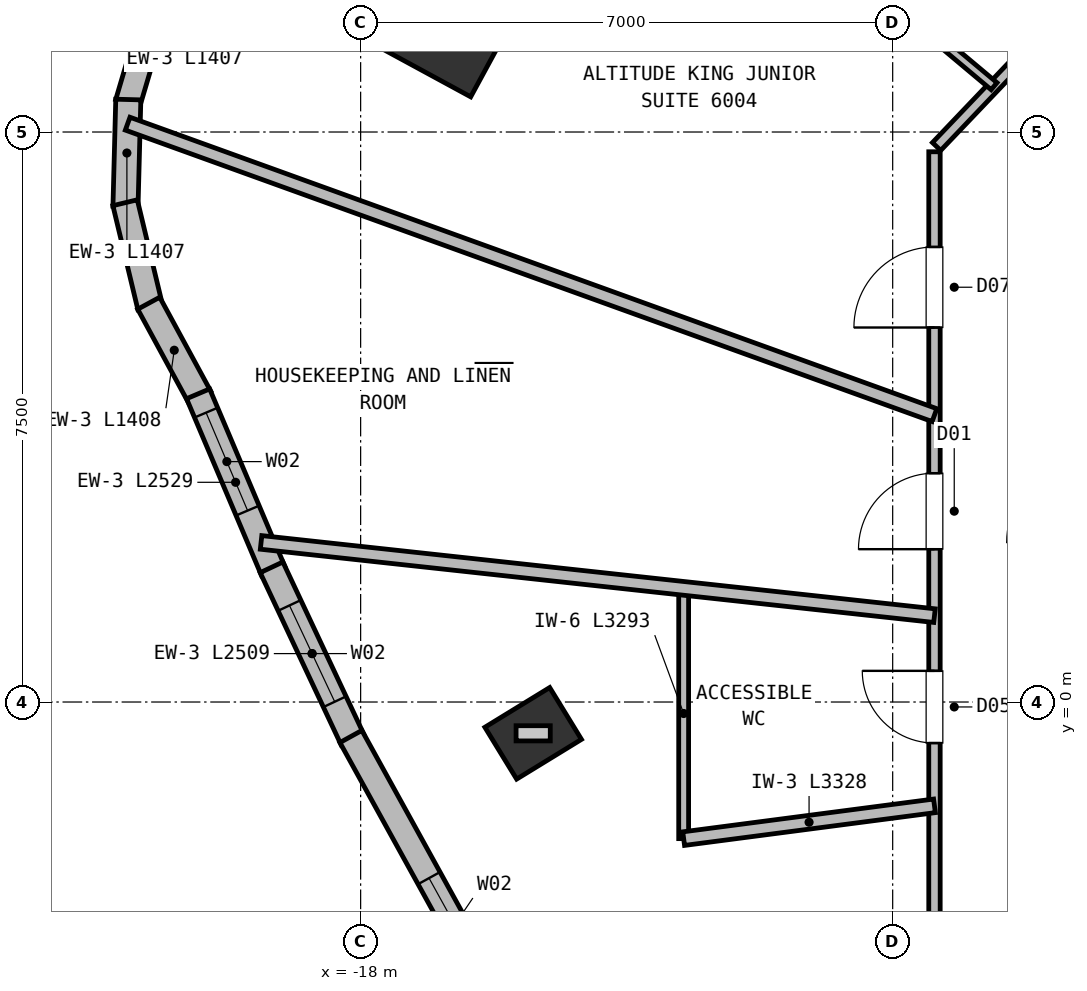
"""IFC4 building model, lengths in metres.
Left out: names, types, materials, properties, quantities, classifications, styles, units other than length and angle.
Written with IfcOpenShell. Run it as: python <this file> out.ifc"""

import sys

from ifc_helpers import new_model, si_unit, direction, frame, frame_2d, origin, origin_2d, place, context, subcontext, project, spatial, rectangle, extrude, element, fill, save


model = new_model("IFC4")
c1 = context("Model", 3, precision=1e-05, world=origin(), true_north=direction((0.0, 1.0)))
c2 = subcontext(c1, "Body", "Model", "MODEL_VIEW")
j1 = project(units=[si_unit("LENGTHUNIT", "METRE"), si_unit("PLANEANGLEUNIT", "RADIAN")], contexts=[c1])
p1 = place(None, origin())
s1 = spatial("IfcSite", under=j1, at=p1, CompositionType="ELEMENT")
p2 = place(p1, origin())
s2 = spatial("IfcBuilding", under=s1, at=p2, CompositionType="ELEMENT")
p3 = place(p2, frame((0.0, 0.0, 228.35)))
s3 = spatial("IfcBuildingStorey", under=s2, at=p3, CompositionType="ELEMENT", Elevation=228.35)
p4 = place(p3, frame((-16.76, 9.1, 0.0), z_axis=(0.0, 0.0, 1.0), x_axis=(-0.878817112662, 0.47715876026, 0.0)))
e1 = element("IfcColumn", 1, at=p4, inside=s3, PredefinedType="COLUMN", context=c2, shape_type="SweptSolid", body=[
    extrude(rectangle(XDim=1.45, YDim=1.8, at=origin_2d()), origin(), (0.0, 0.0, 1.0), 3.8),
])
p5 = place(p3, frame((-15.73, -0.412, 0.0), z_axis=(0.0, 0.0, 1.0), x_axis=(-0.522498564716, 0.852640164354, 0.0)))
e2 = element("IfcColumn", 2, at=p5, inside=s3, PredefinedType="COLUMN", context=c2, shape_type="SweptSolid", body=[
    extrude(rectangle(XDim=0.8, YDim=1.0, at=origin_2d()), origin(), (0.0, 0.0, 1.0), 3.8),
])
p6 = place(p3, frame((-21.065, 7.878, 0.0), z_axis=(0.0, 0.0, 1.0), x_axis=(0.284100140437, 0.958794613149, 0.0)))
e3 = element("IfcWall", 3, at=p6, inside=s3, PredefinedType="SOLIDWALL", context=c2, shape_type="SweptSolid", body=[
    extrude(rectangle(XDim=1.408, YDim=0.33, at=frame_2d((0.704, 0.0))), origin(), (0.0, 0.0, 1.0), 3.55),
])
for number, where, z_axis, x_axis in (
    (4, (-21.094, 6.52, 0.0), (0.0, 0.0, 1.0), (0.026, 1.0, 0.0)),
    (5, (-20.77, 5.201, 0.0), (0.0, 0.0, 1.0), (-0.233, 0.972, 0.0)),
):
    element("IfcWall", number, at=place(p3, frame(where, z_axis=z_axis, x_axis=x_axis)), inside=s3, PredefinedType="SOLIDWALL", context=c2, shape_type="SweptSolid", body=[
        extrude(rectangle(XDim=1.407, YDim=0.33, at=frame_2d((0.704, 0.0))), origin(), (0.0, 0.0, 1.0), 3.55),
    ])
p7 = place(p3, frame((-20.116, 4.01, 0.0), z_axis=(0.0, 0.0, 1.0), x_axis=(-0.477137792558, 0.878828496871, 0.0)))
e6 = element("IfcWall", 6, at=p7, inside=s3, PredefinedType="SOLIDWALL", context=c2, shape_type="SweptSolid", body=[
    extrude(rectangle(XDim=1.408, YDim=0.33, at=frame_2d((0.704, 0.0))), origin(), (0.0, 0.0, 1.0), 3.55),
])
p8 = place(p3, frame((-19.152, 1.727, 0.0), z_axis=(0.0, 0.0, 1.0), x_axis=(-0.390140710462, 0.920755247631, 0.0)))
e7 = element("IfcWall", 7, at=p8, inside=s3, PredefinedType="SOLIDWALL", context=c2, shape_type="SweptSolid", body=[
    extrude(rectangle(XDim=2.529, YDim=0.33, at=frame_2d((1.264, 0.0))), origin(), (0.0, 0.0, 1.0), 3.55),
])
p9 = place(p8, frame((0.86, 0.0, 0.72)))
e8 = element("IfcOpeningElement", 8, at=p9, cuts=e7, PredefinedType="OPENING", context=c2, shape_type="SweptSolid", body=[
    extrude(rectangle(XDim=1.4, YDim=1.84, at=frame_2d((0.7, 0.92))), frame((0.0, 0.175, 0.0), z_axis=(0.0, -1.0, 0.0), x_axis=(1.0, 0.0, 0.0)), (0.0, 0.0, 1.0), 0.35),
])
p10 = place(p3, frame((-18.105, -0.498, 0.0), z_axis=(0.0, 0.0, 1.0), x_axis=(-0.425281427791, 0.905061162119, 0.0)))
e9 = element("IfcWall", 9, at=p10, inside=s3, PredefinedType="SOLIDWALL", context=c2, shape_type="SweptSolid", body=[
    extrude(rectangle(XDim=2.509, YDim=0.33, at=frame_2d((1.254, 0.0))), origin(), (0.0, 0.0, 1.0), 3.55),
])
p11 = place(p10, frame((0.554, 0.0, 0.72)))
e10 = element("IfcOpeningElement", 10, at=p11, cuts=e9, PredefinedType="OPENING", context=c2, shape_type="SweptSolid", body=[
    extrude(rectangle(XDim=1.4, YDim=1.84, at=frame_2d((0.7, 0.92))), frame((0.0, 0.175, 0.0), z_axis=(0.0, -1.0, 0.0), x_axis=(1.0, 0.0, 0.0)), (0.0, 0.0, 1.0), 0.35),
])
p12 = place(p3, frame((-15.395, -5.406, 0.0), z_axis=(0.0, 0.0, 1.0), x_axis=(-0.483083047652, 0.87557453656, 0.0)))
e11 = element("IfcWall", 11, at=p12, inside=s3, PredefinedType="SOLIDWALL", context=c2, shape_type="SweptSolid", body=[
    extrude(rectangle(XDim=5.657, YDim=0.33, at=frame_2d((2.828, 0.0))), origin(), (0.0, 0.0, 1.0), 3.55),
])
p13 = place(p12, frame((2.128, 0.0, 0.72)))
e12 = element("IfcOpeningElement", 12, at=p13, cuts=e11, PredefinedType="OPENING", context=c2, shape_type="SweptSolid", body=[
    extrude(rectangle(XDim=1.4, YDim=1.88, at=frame_2d((0.7, 0.94))), frame((0.0, 0.175, 0.0), z_axis=(0.0, -1.0, 0.0), x_axis=(1.0, 0.0, 0.0)), (0.0, 0.0, 1.0), 0.35),
])
p14 = place(p3, frame((-10.422, 7.309, 0.0), z_axis=(0.0, 0.0, 1.0), x_axis=(0.689960858356, 0.723846678473, 0.0)))
e13 = element("IfcWall", 13, at=p14, inside=s3, PredefinedType="PARTITIONING", context=c2, shape_type="SweptSolid", body=[
    extrude(rectangle(XDim=2.572, YDim=0.15, at=frame_2d((1.286, 0.0))), origin(), (0.0, 0.0, 1.0), 3.55),
])
p15 = place(p3, frame((-10.45, -7.24, 0.0), z_axis=(0.0, 0.0, 1.0), x_axis=(0.0, 1.0, 0.0)))
e14 = element("IfcWall", 14, at=p15, inside=s3, PredefinedType="PARTITIONING", context=c2, shape_type="SweptSolid", body=[
    extrude(rectangle(XDim=14.48, YDim=0.15, at=frame_2d((7.24, 0.0))), origin(), (0.0, 0.0, 1.0), 3.23),
])
p16 = place(p15, frame((6.7, 0.0, 0.0)))
e15 = element("IfcOpeningElement", 15, at=p16, cuts=e14, PredefinedType="OPENING", context=c2, shape_type="SweptSolid", body=[
    extrude(rectangle(XDim=0.95, YDim=2.1, at=frame_2d((0.475, 1.05))), frame((0.0, 0.085, 0.0), z_axis=(0.0, -1.0, 0.0), x_axis=(1.0, 0.0, 0.0)), (0.0, 0.0, 1.0), 0.17),
])
p17 = place(p15, frame((9.251, 0.0, 0.0)))
e16 = element("IfcOpeningElement", 16, at=p17, cuts=e14, PredefinedType="OPENING", context=c2, shape_type="SweptSolid", body=[
    extrude(rectangle(XDim=1.0, YDim=2.15, at=frame_2d((0.5, 1.075))), frame((0.0, 0.085, 0.0), z_axis=(0.0, -1.0, 0.0), x_axis=(1.0, 0.0, 0.0)), (0.0, 0.0, 1.0), 0.17),
])
p18 = place(p15, frame((2.577, 0.0, 0.0)))
e17 = element("IfcOpeningElement", 17, at=p18, cuts=e14, PredefinedType="OPENING", context=c2, shape_type="SweptSolid", body=[
    extrude(rectangle(XDim=1.0, YDim=2.15, at=frame_2d((0.5, 1.075))), frame((0.0, 0.085, 0.0), z_axis=(0.0, -1.0, 0.0), x_axis=(1.0, 0.0, 0.0)), (0.0, 0.0, 1.0), 0.17),
])
p19 = place(p15, frame((12.167, 0.0, 0.0)))
e18 = element("IfcOpeningElement", 18, at=p19, cuts=e14, PredefinedType="OPENING", context=c2, shape_type="SweptSolid", body=[
    extrude(rectangle(XDim=1.06, YDim=2.15, at=frame_2d((0.53, 1.075))), frame((0.0, 0.085, 0.0), z_axis=(0.0, -1.0, 0.0), x_axis=(1.0, 0.0, 0.0)), (0.0, 0.0, 1.0), 0.17),
])
p20 = place(p3, frame((-13.75, -1.798, 0.0), z_axis=(0.0, 0.0, 1.0), x_axis=(0.0, 1.0, 0.0)))
e19 = element("IfcWall", 19, at=p20, inside=s3, PredefinedType="PARTITIONING", context=c2, shape_type="SweptSolid", body=[
    extrude(rectangle(XDim=3.293, YDim=0.13, at=frame_2d((1.646, 0.0))), origin(), (0.0, 0.0, 1.0), 3.55),
])
p21 = place(p3, frame((-10.45, -1.366, 0.0), z_axis=(0.0, 0.0, 1.0), x_axis=(-0.991563556278, -0.129621425164, 0.0)))
e20 = element("IfcWall", 20, at=p21, inside=s3, PredefinedType="PARTITIONING", context=c2, shape_type="SweptSolid", body=[
    extrude(rectangle(XDim=3.328, YDim=0.18, at=frame_2d((1.664, 0.0))), origin(), (0.0, 0.0, 1.0), 3.55),
])
p22 = place(p3, frame((-9.666, 8.103, 0.0), z_axis=(0.0, 0.0, 1.0), x_axis=(-0.766392114791, 0.64237304301, 0.0)))
e21 = element("IfcWall", 21, at=p22, inside=s3, PredefinedType="PARTITIONING", context=c2, shape_type="SweptSolid", body=[
    extrude(rectangle(XDim=2.455, YDim=0.12, at=frame_2d((1.228, 0.0))), origin(), (0.0, 0.0, 1.0), 3.55),
])
p23 = place(p3, frame((-10.45, 3.775, 0.0), z_axis=(0.0, 0.0, 1.0), x_axis=(-0.9405132002, 0.339757148931, 0.0)))
e22 = element("IfcWall", 22, at=p23, inside=s3, PredefinedType="PARTITIONING", context=c2, shape_type="SweptSolid", body=[
    extrude(rectangle(XDim=11.287, YDim=0.18, at=frame_2d((5.643, 0.0))), origin(), (0.0, 0.0, 1.0), 3.55),
])
p24 = place(p3, frame((-10.45, 1.136, 0.0), z_axis=(0.0, 0.0, 1.0), x_axis=(-0.994137295644, 0.108125100741, 0.0)))
e23 = element("IfcWall", 23, at=p24, inside=s3, PredefinedType="PARTITIONING", context=c2, shape_type="SweptSolid", body=[
    extrude(rectangle(XDim=8.912, YDim=0.18, at=frame_2d((4.456, 0.0))), origin(), (0.0, 0.0, 1.0), 3.55),
])
p25 = place(p9, origin())
e24 = element("IfcWindow", 24, at=p25, inside=s3, PartitioningType="SINGLE_PANEL", PredefinedType="WINDOW", context=c2, shape_type="SweptSolid", body=[
    extrude(rectangle(XDim=1.4, YDim=1.84, at=frame_2d((0.7, 0.92))), frame((0.0, 0.03, 0.0), z_axis=(0.0, -1.0, 0.0), x_axis=(1.0, 0.0, 0.0)), (0.0, 0.0, 1.0), 0.06),
])
fill(e8, e24)
p26 = place(p11, origin())
e25 = element("IfcWindow", 25, at=p26, inside=s3, PartitioningType="SINGLE_PANEL", PredefinedType="WINDOW", context=c2, shape_type="SweptSolid", body=[
    extrude(rectangle(XDim=1.4, YDim=1.84, at=frame_2d((0.7, 0.92))), frame((0.0, 0.03, 0.0), z_axis=(0.0, -1.0, 0.0), x_axis=(1.0, 0.0, 0.0)), (0.0, 0.0, 1.0), 0.06),
])
fill(e10, e25)
p27 = place(p13, origin())
e26 = element("IfcWindow", 26, at=p27, inside=s3, PartitioningType="SINGLE_PANEL", PredefinedType="WINDOW", context=c2, shape_type="SweptSolid", body=[
    extrude(rectangle(XDim=1.4, YDim=1.88, at=frame_2d((0.7, 0.94))), frame((0.0, 0.03, 0.0), z_axis=(0.0, -1.0, 0.0), x_axis=(1.0, 0.0, 0.0)), (0.0, 0.0, 1.0), 0.06),
])
fill(e12, e26)
p28 = place(p16, origin())
e27 = element("IfcDoor", 27, at=p28, inside=s3, OperationType="SINGLE_SWING_RIGHT", PredefinedType="DOOR", context=c2, shape_type="SweptSolid", body=[
    extrude(rectangle(XDim=0.95, YDim=2.1, at=frame_2d((0.475, 1.05))), frame((0.0, 0.025, 0.0), z_axis=(0.0, -1.0, 0.0), x_axis=(1.0, 0.0, 0.0)), (0.0, 0.0, 1.0), 0.05),
])
fill(e15, e27)
p29 = place(p17, origin())
e28 = element("IfcDoor", 28, at=p29, inside=s3, OperationType="SINGLE_SWING_LEFT", PredefinedType="DOOR", context=c2, shape_type="SweptSolid", body=[
    extrude(rectangle(XDim=1.0, YDim=2.15, at=frame_2d((0.5, 1.075))), frame((0.0, 0.025, 0.0), z_axis=(0.0, -1.0, 0.0), x_axis=(1.0, 0.0, 0.0)), (0.0, 0.0, 1.0), 0.05),
])
fill(e16, e28)
p30 = place(p19, origin())
e29 = element("IfcDoor", 29, at=p30, inside=s3, OperationType="SINGLE_SWING_LEFT", PredefinedType="DOOR", context=c2, shape_type="SweptSolid", body=[
    extrude(rectangle(XDim=1.06, YDim=2.15, at=frame_2d((0.53, 1.075))), frame((0.0, 0.025, 0.0), z_axis=(0.0, -1.0, 0.0), x_axis=(1.0, 0.0, 0.0)), (0.0, 0.0, 1.0), 0.05),
])
fill(e18, e29)
save(model, sys.argv[1])
